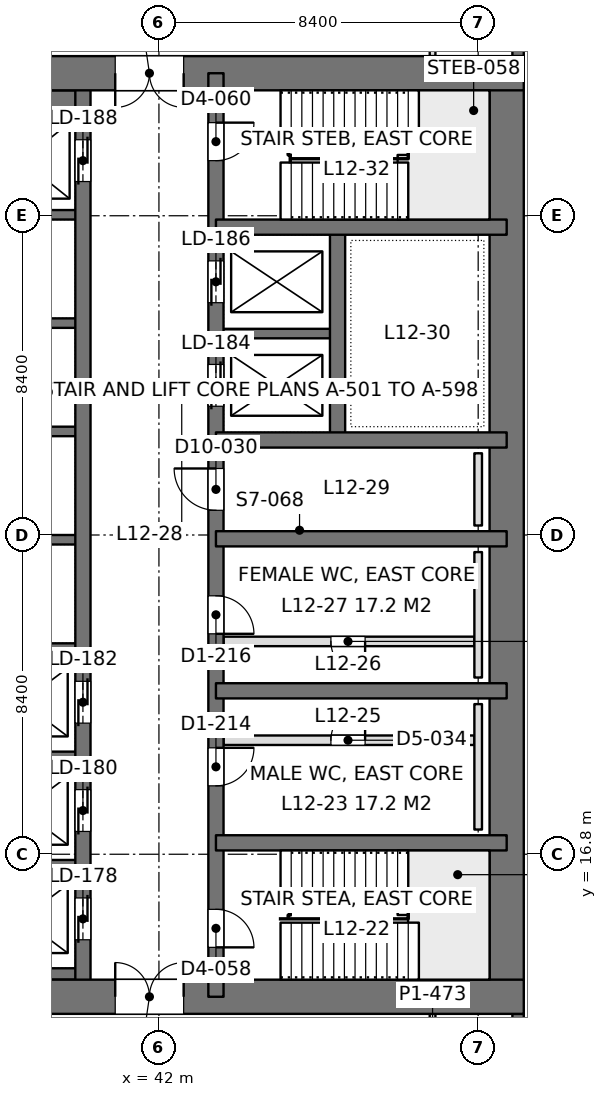
"""IFC4 building model, lengths in metres.
Left out: names, types, materials, properties, quantities, classifications, styles, units other than length and angle.
Written with IfcOpenShell. Run it as: python <this file> out.ifc"""

import sys

from ifc_helpers import new_model, si_unit, direction, frame, frame_2d, origin, place, context, subcontext, project, spatial, rectangle, extrude, element, fill, save


model = new_model("IFC4")
c1 = context("Model", 3, precision=1e-05, world=origin(), true_north=direction((0.0, 1.0)))
c2 = subcontext(c1, "Body", "Model", "MODEL_VIEW")
j1 = project(units=[si_unit("LENGTHUNIT", "METRE"), si_unit("PLANEANGLEUNIT", "RADIAN")], contexts=[c1])
p1 = place(None, origin())
s1 = spatial("IfcSite", under=j1, at=p1, CompositionType="ELEMENT")
p2 = place(p1, origin())
s2 = spatial("IfcBuilding", under=s1, at=p2, CompositionType="ELEMENT")
p3 = place(p2, frame((0.0, 0.0, 54.9)))
s3 = spatial("IfcBuildingStorey", under=s2, at=p3, CompositionType="ELEMENT", Elevation=54.9)
p4 = place(p3, frame((33.6, 13.05, 0.0), z_axis=(0.0, 0.0, 1.0), x_axis=(1.0, 0.0, 0.0)))
e1 = element("IfcWall", 1, at=p4, inside=s3, PredefinedType="SHEAR", context=c2, shape_type="SweptSolid", body=[
    extrude(rectangle(XDim=18.0, YDim=0.9, at=frame_2d((9.0, 0.0))), origin(), (0.0, 0.0, 1.0), 4.5),
])
p5 = place(p4, frame((7.25, 0.0, 0.0)))
e2 = element("IfcOpeningElement", 2, at=p5, cuts=e1, PredefinedType="OPENING", context=c2, shape_type="SweptSolid", body=[
    extrude(rectangle(XDim=1.8, YDim=2.4, at=frame_2d((0.9, 1.2))), frame((0.0, 0.46, 0.0), z_axis=(0.0, -1.0, 0.0), x_axis=(1.0, 0.0, 0.0)), (0.0, 0.0, 1.0), 0.92),
])
p6 = place(p3, frame((33.6, 37.35, 0.0), z_axis=(0.0, 0.0, 1.0), x_axis=(1.0, 0.0, 0.0)))
e3 = element("IfcWall", 3, at=p6, inside=s3, PredefinedType="SHEAR", context=c2, shape_type="SweptSolid", body=[
    extrude(rectangle(XDim=18.0, YDim=0.9, at=frame_2d((9.0, 0.0))), origin(), (0.0, 0.0, 1.0), 4.5),
])
p7 = place(p6, frame((7.25, 0.0, 0.0)))
e4 = element("IfcOpeningElement", 4, at=p7, cuts=e3, PredefinedType="OPENING", context=c2, shape_type="SweptSolid", body=[
    extrude(rectangle(XDim=1.8, YDim=2.4, at=frame_2d((0.9, 1.2))), frame((0.0, 0.46, 0.0), z_axis=(0.0, -1.0, 0.0), x_axis=(1.0, 0.0, 0.0)), (0.0, 0.0, 1.0), 0.92),
])
p8 = place(p3, frame((51.15, 13.05, 0.0), z_axis=(0.0, 0.0, 1.0), x_axis=(0.0, 1.0, 0.0)))
e5 = element("IfcWall", 5, at=p8, inside=s3, PredefinedType="SHEAR", context=c2, shape_type="SweptSolid", body=[
    extrude(rectangle(XDim=24.3, YDim=0.9, at=frame_2d((12.15, 0.0))), origin(), (0.0, 0.0, 1.0), 4.5),
])
p9 = place(p3, frame((43.5, 13.05, 0.0), z_axis=(0.0, 0.0, 1.0), x_axis=(0.0, 1.0, 0.0)))
e6 = element("IfcWall", 6, at=p9, inside=s3, PredefinedType="SHEAR", context=c2, shape_type="SweptSolid", body=[
    extrude(rectangle(XDim=24.3, YDim=0.4, at=frame_2d((12.15, 0.0))), origin(), (0.0, 0.0, 1.0), 4.5),
])
p10 = place(p9, frame((1.3, 0.0, 0.0)))
e7 = element("IfcOpeningElement", 7, at=p10, cuts=e6, PredefinedType="OPENING", context=c2, shape_type="SweptSolid", body=[
    extrude(rectangle(XDim=1.0, YDim=2.2, at=frame_2d((0.5, 1.1))), frame((0.0, 0.21, 0.0), z_axis=(0.0, -1.0, 0.0), x_axis=(1.0, 0.0, 0.0)), (0.0, 0.0, 1.0), 0.42),
])
p11 = place(p9, frame((22.0, 0.0, 0.0)))
e8 = element("IfcOpeningElement", 8, at=p11, cuts=e6, PredefinedType="OPENING", context=c2, shape_type="SweptSolid", body=[
    extrude(rectangle(XDim=1.0, YDim=2.2, at=frame_2d((0.5, 1.1))), frame((0.0, 0.21, 0.0), z_axis=(0.0, -1.0, 0.0), x_axis=(1.0, 0.0, 0.0)), (0.0, 0.0, 1.0), 0.42),
])
p12 = place(p9, frame((5.55, 0.0, 0.0)))
e9 = element("IfcOpeningElement", 9, at=p12, cuts=e6, PredefinedType="OPENING", context=c2, shape_type="SweptSolid", body=[
    extrude(rectangle(XDim=1.0, YDim=2.2, at=frame_2d((0.5, 1.1))), frame((0.0, 0.21, 0.0), z_axis=(0.0, -1.0, 0.0), x_axis=(1.0, 0.0, 0.0)), (0.0, 0.0, 1.0), 0.42),
])
p13 = place(p9, frame((9.55, 0.0, 0.0)))
e10 = element("IfcOpeningElement", 10, at=p13, cuts=e6, PredefinedType="OPENING", context=c2, shape_type="SweptSolid", body=[
    extrude(rectangle(XDim=1.0, YDim=2.2, at=frame_2d((0.5, 1.1))), frame((0.0, 0.21, 0.0), z_axis=(0.0, -1.0, 0.0), x_axis=(1.0, 0.0, 0.0)), (0.0, 0.0, 1.0), 0.42),
])
p14 = place(p9, frame((12.8, 0.0, 0.0)))
e11 = element("IfcOpeningElement", 11, at=p14, cuts=e6, PredefinedType="OPENING", context=c2, shape_type="SweptSolid", body=[
    extrude(rectangle(XDim=1.1, YDim=2.2, at=frame_2d((0.55, 1.1))), frame((0.0, 0.21, 0.0), z_axis=(0.0, -1.0, 0.0), x_axis=(1.0, 0.0, 0.0)), (0.0, 0.0, 1.0), 0.42),
])
p15 = place(p9, frame((15.538, 0.0, 0.0)))
e12 = element("IfcOpeningElement", 12, at=p15, cuts=e6, PredefinedType="OPENING", context=c2, shape_type="SweptSolid", body=[
    extrude(rectangle(XDim=1.1, YDim=2.2, at=frame_2d((0.55, 1.1))), frame((0.0, 0.21, 0.0), z_axis=(0.0, -1.0, 0.0), x_axis=(1.0, 0.0, 0.0)), (0.0, 0.0, 1.0), 0.42),
])
p16 = place(p9, frame((18.262, 0.0, 0.0)))
e13 = element("IfcOpeningElement", 13, at=p16, cuts=e6, PredefinedType="OPENING", context=c2, shape_type="SweptSolid", body=[
    extrude(rectangle(XDim=1.1, YDim=2.2, at=frame_2d((0.55, 1.1))), frame((0.0, 0.21, 0.0), z_axis=(0.0, -1.0, 0.0), x_axis=(1.0, 0.0, 0.0)), (0.0, 0.0, 1.0), 0.42),
])
p17 = place(p3, frame((40.0, 13.05, 0.0), z_axis=(0.0, 0.0, 1.0), x_axis=(0.0, 1.0, 0.0)))
e14 = element("IfcWall", 14, at=p17, inside=s3, PredefinedType="SHEAR", context=c2, shape_type="SweptSolid", body=[
    extrude(rectangle(XDim=24.3, YDim=0.4, at=frame_2d((12.15, 0.0))), origin(), (0.0, 0.0, 1.0), 4.5),
])
p18 = place(p17, frame((1.5, 0.0, 0.0)))
e15 = element("IfcOpeningElement", 15, at=p18, cuts=e14, PredefinedType="OPENING", context=c2, shape_type="SweptSolid", body=[
    extrude(rectangle(XDim=1.1, YDim=2.2, at=frame_2d((0.55, 1.1))), frame((0.0, 0.21, 0.0), z_axis=(0.0, -1.0, 0.0), x_axis=(1.0, 0.0, 0.0)), (0.0, 0.0, 1.0), 0.42),
])
p19 = place(p17, frame((4.35, 0.0, 0.0)))
e16 = element("IfcOpeningElement", 16, at=p19, cuts=e14, PredefinedType="OPENING", context=c2, shape_type="SweptSolid", body=[
    extrude(rectangle(XDim=1.1, YDim=2.2, at=frame_2d((0.55, 1.1))), frame((0.0, 0.21, 0.0), z_axis=(0.0, -1.0, 0.0), x_axis=(1.0, 0.0, 0.0)), (0.0, 0.0, 1.0), 0.42),
])
p20 = place(p17, frame((7.2, 0.0, 0.0)))
e17 = element("IfcOpeningElement", 17, at=p20, cuts=e14, PredefinedType="OPENING", context=c2, shape_type="SweptSolid", body=[
    extrude(rectangle(XDim=1.1, YDim=2.2, at=frame_2d((0.55, 1.1))), frame((0.0, 0.21, 0.0), z_axis=(0.0, -1.0, 0.0), x_axis=(1.0, 0.0, 0.0)), (0.0, 0.0, 1.0), 0.42),
])
p21 = place(p17, frame((21.45, 0.0, 0.0)))
e18 = element("IfcOpeningElement", 18, at=p21, cuts=e14, PredefinedType="OPENING", context=c2, shape_type="SweptSolid", body=[
    extrude(rectangle(XDim=1.1, YDim=2.2, at=frame_2d((0.55, 1.1))), frame((0.0, 0.21, 0.0), z_axis=(0.0, -1.0, 0.0), x_axis=(1.0, 0.0, 0.0)), (0.0, 0.0, 1.0), 0.42),
])
for number, where, z_axis, x_axis in (
    (19, (51.15, 17.1, 0.0), (0.0, 0.0, 1.0), (-1.0, 0.0, 0.0)),
    (20, (51.15, 21.1, 0.0), (0.0, 0.0, 1.0), (-1.0, 0.0, 0.0)),
    (21, (51.15, 25.1, 0.0), (0.0, 0.0, 1.0), (-1.0, 0.0, 0.0)),
    (22, (51.15, 27.7, 0.0), (0.0, 0.0, 1.0), (-1.0, 0.0, 0.0)),
    (23, (51.15, 33.3, 0.0), (0.0, 0.0, 1.0), (-1.0, 0.0, 0.0)),
):
    element("IfcWall", number, at=place(p3, frame(where, z_axis=z_axis, x_axis=x_axis)), inside=s3, PredefinedType="SHEAR", context=c2, shape_type="SweptSolid", body=[
        extrude(rectangle(XDim=7.65, YDim=0.4, at=frame_2d((3.825, 0.0))), origin(), (0.0, 0.0, 1.0), 4.5),
    ])
p22 = place(p3, frame((46.7, 27.7, 0.0), z_axis=(0.0, 0.0, 1.0), x_axis=(0.0, 1.0, 0.0)))
e24 = element("IfcWall", 24, at=p22, inside=s3, PredefinedType="SHEAR", context=c2, shape_type="SweptSolid", body=[
    extrude(rectangle(XDim=5.6, YDim=0.4, at=frame_2d((2.8, 0.0))), origin(), (0.0, 0.0, 1.0), 4.5),
])
p23 = place(p3, frame((46.7, 30.5, 0.0), z_axis=(0.0, 0.0, 1.0), x_axis=(-1.0, 0.0, 0.0)))
e25 = element("IfcWall", 25, at=p23, inside=s3, PredefinedType="SHEAR", context=c2, shape_type="SweptSolid", body=[
    extrude(rectangle(XDim=3.2, YDim=0.25, at=frame_2d((1.6, 0.0))), origin(), (0.0, 0.0, 1.0), 4.5),
])
p24 = place(p3, frame((40.0, 13.65, 0.0), z_axis=(0.0, 0.0, 1.0), x_axis=(-1.0, 0.0, 0.0)))
e26 = element("IfcWall", 26, at=p24, inside=s3, PredefinedType="SHEAR", context=c2, shape_type="SweptSolid", body=[
    extrude(rectangle(XDim=3.2, YDim=0.3, at=frame_2d((1.6, 0.0))), origin(), (0.0, 0.0, 1.0), 4.5),
])
for number, where, z_axis, x_axis in (
    (27, (40.0, 16.525, 0.0), (0.0, 0.0, 1.0), (-1.0, 0.0, 0.0)),
    (28, (40.0, 19.375, 0.0), (0.0, 0.0, 1.0), (-1.0, 0.0, 0.0)),
    (29, (40.0, 22.225, 0.0), (0.0, 0.0, 1.0), (-1.0, 0.0, 0.0)),
    (30, (40.0, 25.075, 0.0), (0.0, 0.0, 1.0), (-1.0, 0.0, 0.0)),
    (31, (40.0, 27.925, 0.0), (0.0, 0.0, 1.0), (-1.0, 0.0, 0.0)),
    (32, (40.0, 30.775, 0.0), (0.0, 0.0, 1.0), (-1.0, 0.0, 0.0)),
    (33, (40.0, 33.625, 0.0), (0.0, 0.0, 1.0), (-1.0, 0.0, 0.0)),
):
    element("IfcWall", number, at=place(p3, frame(where, z_axis=z_axis, x_axis=x_axis)), inside=s3, PredefinedType="SHEAR", context=c2, shape_type="SweptSolid", body=[
        extrude(rectangle(XDim=3.2, YDim=0.25, at=frame_2d((1.6, 0.0))), origin(), (0.0, 0.0, 1.0), 4.5),
    ])
p25 = place(p3, frame((40.0, 36.625, 0.0), z_axis=(0.0, 0.0, 1.0), x_axis=(-1.0, 0.0, 0.0)))
e34 = element("IfcWall", 34, at=p25, inside=s3, PredefinedType="SHEAR", context=c2, shape_type="SweptSolid", body=[
    extrude(rectangle(XDim=3.2, YDim=0.55, at=frame_2d((1.6, 0.0))), origin(), (0.0, 0.0, 1.0), 4.5),
])
p26 = place(p3, frame((51.45, 42.0, 0.0), z_axis=(0.0, 0.0, 1.0), x_axis=(0.0, -1.0, 0.0)))
e35 = element("IfcWall", 35, at=p26, inside=s3, PredefinedType="SOLIDWALL", context=c2, shape_type="SweptSolid", body=[
    extrude(rectangle(XDim=4.2, YDim=0.3, at=frame_2d((2.1, 0.0))), origin(), (0.0, 0.0, 1.0), 4.34),
])
p27 = place(p26, frame((0.9, 0.0, 0.9)))
e36 = element("IfcOpeningElement", 36, at=p27, cuts=e35, PredefinedType="OPENING", context=c2, shape_type="SweptSolid", body=[
    extrude(rectangle(XDim=2.4, YDim=1.9, at=frame_2d((1.2, 0.95))), frame((0.0, 0.16, 0.0), z_axis=(0.0, -1.0, 0.0), x_axis=(1.0, 0.0, 0.0)), (0.0, 0.0, 1.0), 0.32),
])
p28 = place(p3, frame((51.45, 12.6, 0.0), z_axis=(0.0, 0.0, 1.0), x_axis=(0.0, -1.0, 0.0)))
e37 = element("IfcWall", 37, at=p28, inside=s3, PredefinedType="SOLIDWALL", context=c2, shape_type="SweptSolid", body=[
    extrude(rectangle(XDim=4.2, YDim=0.3, at=frame_2d((2.1, 0.0))), origin(), (0.0, 0.0, 1.0), 4.34),
])
p29 = place(p28, frame((0.9, 0.0, 0.9)))
e38 = element("IfcOpeningElement", 38, at=p29, cuts=e37, PredefinedType="OPENING", context=c2, shape_type="SweptSolid", body=[
    extrude(rectangle(XDim=2.4, YDim=1.9, at=frame_2d((1.2, 0.95))), frame((0.0, 0.16, 0.0), z_axis=(0.0, -1.0, 0.0), x_axis=(1.0, 0.0, 0.0)), (0.0, 0.0, 1.0), 0.32),
])
p30 = place(p3, frame((49.2, 10.4, 0.0), z_axis=(0.0, 0.0, 1.0), x_axis=(0.0, 1.0, 0.0)))
e39 = element("IfcWall", 39, at=p30, inside=s3, PredefinedType="PARTITIONING", context=c2, shape_type="SweptSolid", body=[
    extrude(rectangle(XDim=2.202, YDim=0.15, at=frame_2d((1.101, 0.0))), origin(), (0.0, 0.0, 1.0), 4.34),
])
p31 = place(p3, frame((49.2, 37.8, 0.0), z_axis=(0.0, 0.0, 1.0), x_axis=(0.0, 1.0, 0.0)))
e40 = element("IfcWall", 40, at=p31, inside=s3, PredefinedType="PARTITIONING", context=c2, shape_type="SweptSolid", body=[
    extrude(rectangle(XDim=2.2, YDim=0.15, at=frame_2d((1.1, 0.0))), origin(), (0.0, 0.0, 1.0), 4.34),
])
p32 = place(p3, frame((43.7, 22.4, 0.0), z_axis=(0.0, 0.0, 1.0), x_axis=(1.0, 0.0, 0.0)))
e41 = element("IfcWall", 41, at=p32, inside=s3, PredefinedType="PARTITIONING", context=c2, shape_type="SweptSolid", body=[
    extrude(rectangle(XDim=6.6, YDim=0.25, at=frame_2d((3.3, 0.0))), origin(), (0.0, 0.0, 1.0), 4.3),
])
p33 = place(p32, frame((2.825, 0.0, 0.0)))
e42 = element("IfcOpeningElement", 42, at=p33, cuts=e41, PredefinedType="OPENING", context=c2, shape_type="SweptSolid", body=[
    extrude(rectangle(XDim=0.9, YDim=2.2, at=frame_2d((0.45, 1.1))), frame((0.0, 0.135, 0.0), z_axis=(0.0, -1.0, 0.0), x_axis=(1.0, 0.0, 0.0)), (0.0, 0.0, 1.0), 0.27),
])
p34 = place(p3, frame((43.7, 19.8, 0.0), z_axis=(0.0, 0.0, 1.0), x_axis=(1.0, 0.0, 0.0)))
e43 = element("IfcWall", 43, at=p34, inside=s3, PredefinedType="PARTITIONING", context=c2, shape_type="SweptSolid", body=[
    extrude(rectangle(XDim=6.6, YDim=0.25, at=frame_2d((3.3, 0.0))), origin(), (0.0, 0.0, 1.0), 4.3),
])
p35 = place(p34, frame((2.825, 0.0, 0.0)))
e44 = element("IfcOpeningElement", 44, at=p35, cuts=e43, PredefinedType="OPENING", context=c2, shape_type="SweptSolid", body=[
    extrude(rectangle(XDim=0.9, YDim=2.2, at=frame_2d((0.45, 1.1))), frame((0.0, 0.135, 0.0), z_axis=(0.0, -1.0, 0.0), x_axis=(1.0, 0.0, 0.0)), (0.0, 0.0, 1.0), 0.27),
])
for number, where, z_axis, x_axis in (
    (45, (50.4, 17.45, 0.0), (0.0, 0.0, 1.0), (0.0, 1.0, 0.0)),
    (46, (50.4, 21.45, 0.0), (0.0, 0.0, 1.0), (0.0, 1.0, 0.0)),
):
    element("IfcWall", number, at=place(p3, frame(where, z_axis=z_axis, x_axis=x_axis)), inside=s3, PredefinedType="PLUMBINGWALL", context=c2, shape_type="SweptSolid", body=[
        extrude(rectangle(XDim=3.3, YDim=0.2, at=frame_2d((1.65, 0.0))), origin(), (0.0, 0.0, 1.0), 1.2),
    ])
p36 = place(p3, frame((50.4, 25.45, 0.0), z_axis=(0.0, 0.0, 1.0), x_axis=(0.0, 1.0, 0.0)))
e47 = element("IfcWall", 47, at=p36, inside=s3, PredefinedType="PLUMBINGWALL", context=c2, shape_type="SweptSolid", body=[
    extrude(rectangle(XDim=1.9, YDim=0.2, at=frame_2d((0.95, 0.0))), origin(), (0.0, 0.0, 1.0), 1.2),
])
p37 = place(p5, origin())
e48 = element("IfcDoor", 48, at=p37, inside=s3, OperationType="DOUBLE_DOOR_SINGLE_SWING", PredefinedType="DOOR", context=c2, shape_type="SweptSolid", body=[
    extrude(rectangle(XDim=1.8, YDim=2.4, at=frame_2d((0.9, 1.2))), frame((0.0, 0.025, 0.0), z_axis=(0.0, -1.0, 0.0), x_axis=(1.0, 0.0, 0.0)), (0.0, 0.0, 1.0), 0.05),
])
fill(e2, e48)
p38 = place(p7, frame((1.8, 0.0, 0.0), z_axis=(0.0, 0.0, 1.0), x_axis=(-1.0, 0.0, 0.0)))
e49 = element("IfcDoor", 49, at=p38, inside=s3, OperationType="DOUBLE_DOOR_SINGLE_SWING", PredefinedType="DOOR", context=c2, shape_type="SweptSolid", body=[
    extrude(rectangle(XDim=1.8, YDim=2.4, at=frame_2d((0.9, 1.2))), frame((0.0, 0.025, 0.0), z_axis=(0.0, -1.0, 0.0), x_axis=(1.0, 0.0, 0.0)), (0.0, 0.0, 1.0), 0.05),
])
fill(e4, e49)
p39 = place(p10, frame((1.0, 0.0, 0.0), z_axis=(0.0, 0.0, 1.0), x_axis=(-1.0, 0.0, 0.0)))
e50 = element("IfcDoor", 50, at=p39, inside=s3, OperationType="SINGLE_SWING_RIGHT", PredefinedType="DOOR", context=c2, shape_type="SweptSolid", body=[
    extrude(rectangle(XDim=1.0, YDim=2.2, at=frame_2d((0.5, 1.1))), frame((0.0, 0.025, 0.0), z_axis=(0.0, -1.0, 0.0), x_axis=(1.0, 0.0, 0.0)), (0.0, 0.0, 1.0), 0.05),
])
fill(e7, e50)
p40 = place(p11, frame((1.0, 0.0, 0.0), z_axis=(0.0, 0.0, 1.0), x_axis=(-1.0, 0.0, 0.0)))
e51 = element("IfcDoor", 51, at=p40, inside=s3, OperationType="SINGLE_SWING_LEFT", PredefinedType="DOOR", context=c2, shape_type="SweptSolid", body=[
    extrude(rectangle(XDim=1.0, YDim=2.2, at=frame_2d((0.5, 1.1))), frame((0.0, 0.025, 0.0), z_axis=(0.0, -1.0, 0.0), x_axis=(1.0, 0.0, 0.0)), (0.0, 0.0, 1.0), 0.05),
])
fill(e8, e51)
p41 = place(p12, frame((1.0, 0.0, 0.0), z_axis=(0.0, 0.0, 1.0), x_axis=(-1.0, 0.0, 0.0)))
e52 = element("IfcDoor", 52, at=p41, inside=s3, OperationType="SINGLE_SWING_LEFT", PredefinedType="DOOR", context=c2, shape_type="SweptSolid", body=[
    extrude(rectangle(XDim=1.0, YDim=2.2, at=frame_2d((0.5, 1.1))), frame((0.0, 0.025, 0.0), z_axis=(0.0, -1.0, 0.0), x_axis=(1.0, 0.0, 0.0)), (0.0, 0.0, 1.0), 0.05),
])
fill(e9, e52)
p42 = place(p13, frame((1.0, 0.0, 0.0), z_axis=(0.0, 0.0, 1.0), x_axis=(-1.0, 0.0, 0.0)))
e53 = element("IfcDoor", 53, at=p42, inside=s3, OperationType="SINGLE_SWING_RIGHT", PredefinedType="DOOR", context=c2, shape_type="SweptSolid", body=[
    extrude(rectangle(XDim=1.0, YDim=2.2, at=frame_2d((0.5, 1.1))), frame((0.0, 0.025, 0.0), z_axis=(0.0, -1.0, 0.0), x_axis=(1.0, 0.0, 0.0)), (0.0, 0.0, 1.0), 0.05),
])
fill(e10, e53)
p43 = place(p14, origin())
e54 = element("IfcDoor", 54, at=p43, inside=s3, OperationType="SINGLE_SWING_RIGHT", PredefinedType="DOOR", context=c2, shape_type="SweptSolid", body=[
    extrude(rectangle(XDim=1.1, YDim=2.2, at=frame_2d((0.55, 1.1))), frame((0.0, 0.025, 0.0), z_axis=(0.0, -1.0, 0.0), x_axis=(1.0, 0.0, 0.0)), (0.0, 0.0, 1.0), 0.05),
])
fill(e11, e54)
p44 = place(p18, origin())
e55 = element("IfcDoor", 55, at=p44, inside=s3, OperationType="DOUBLE_DOOR_SLIDING", PredefinedType="DOOR", context=c2, shape_type="SweptSolid", body=[
    extrude(rectangle(XDim=1.1, YDim=2.2, at=frame_2d((0.55, 1.1))), frame((0.0, 0.025, 0.0), z_axis=(0.0, -1.0, 0.0), x_axis=(1.0, 0.0, 0.0)), (0.0, 0.0, 1.0), 0.05),
])
fill(e15, e55)
p45 = place(p19, origin())
e56 = element("IfcDoor", 56, at=p45, inside=s3, OperationType="DOUBLE_DOOR_SLIDING", PredefinedType="DOOR", context=c2, shape_type="SweptSolid", body=[
    extrude(rectangle(XDim=1.1, YDim=2.2, at=frame_2d((0.55, 1.1))), frame((0.0, 0.025, 0.0), z_axis=(0.0, -1.0, 0.0), x_axis=(1.0, 0.0, 0.0)), (0.0, 0.0, 1.0), 0.05),
])
fill(e16, e56)
p46 = place(p20, origin())
e57 = element("IfcDoor", 57, at=p46, inside=s3, OperationType="DOUBLE_DOOR_SLIDING", PredefinedType="DOOR", context=c2, shape_type="SweptSolid", body=[
    extrude(rectangle(XDim=1.1, YDim=2.2, at=frame_2d((0.55, 1.1))), frame((0.0, 0.025, 0.0), z_axis=(0.0, -1.0, 0.0), x_axis=(1.0, 0.0, 0.0)), (0.0, 0.0, 1.0), 0.05),
])
fill(e17, e57)
p47 = place(p21, origin())
e58 = element("IfcDoor", 58, at=p47, inside=s3, OperationType="DOUBLE_DOOR_SLIDING", PredefinedType="DOOR", context=c2, shape_type="SweptSolid", body=[
    extrude(rectangle(XDim=1.1, YDim=2.2, at=frame_2d((0.55, 1.1))), frame((0.0, 0.025, 0.0), z_axis=(0.0, -1.0, 0.0), x_axis=(1.0, 0.0, 0.0)), (0.0, 0.0, 1.0), 0.05),
])
fill(e18, e58)
p48 = place(p15, origin())
e59 = element("IfcDoor", 59, at=p48, inside=s3, OperationType="DOUBLE_DOOR_SLIDING", PredefinedType="DOOR", context=c2, shape_type="SweptSolid", body=[
    extrude(rectangle(XDim=1.1, YDim=2.2, at=frame_2d((0.55, 1.1))), frame((0.0, 0.025, 0.0), z_axis=(0.0, -1.0, 0.0), x_axis=(1.0, 0.0, 0.0)), (0.0, 0.0, 1.0), 0.05),
])
fill(e12, e59)
p49 = place(p16, origin())
e60 = element("IfcDoor", 60, at=p49, inside=s3, OperationType="DOUBLE_DOOR_SLIDING", PredefinedType="DOOR", context=c2, shape_type="SweptSolid", body=[
    extrude(rectangle(XDim=1.1, YDim=2.2, at=frame_2d((0.55, 1.1))), frame((0.0, 0.025, 0.0), z_axis=(0.0, -1.0, 0.0), x_axis=(1.0, 0.0, 0.0)), (0.0, 0.0, 1.0), 0.05),
])
fill(e13, e60)
p50 = place(p33, frame((0.9, 0.0, 0.0), z_axis=(0.0, 0.0, 1.0), x_axis=(-1.0, 0.0, 0.0)))
e61 = element("IfcDoor", 61, at=p50, inside=s3, OperationType="SINGLE_SWING_LEFT", PredefinedType="DOOR", context=c2, shape_type="SweptSolid", body=[
    extrude(rectangle(XDim=0.9, YDim=2.2, at=frame_2d((0.45, 1.1))), frame((0.0, 0.025, 0.0), z_axis=(0.0, -1.0, 0.0), x_axis=(1.0, 0.0, 0.0)), (0.0, 0.0, 1.0), 0.05),
])
fill(e42, e61)
p51 = place(p35, origin())
e62 = element("IfcDoor", 62, at=p51, inside=s3, OperationType="SINGLE_SWING_RIGHT", PredefinedType="DOOR", context=c2, shape_type="SweptSolid", body=[
    extrude(rectangle(XDim=0.9, YDim=2.2, at=frame_2d((0.45, 1.1))), frame((0.0, 0.025, 0.0), z_axis=(0.0, -1.0, 0.0), x_axis=(1.0, 0.0, 0.0)), (0.0, 0.0, 1.0), 0.05),
])
fill(e44, e62)
save(model, sys.argv[1])
